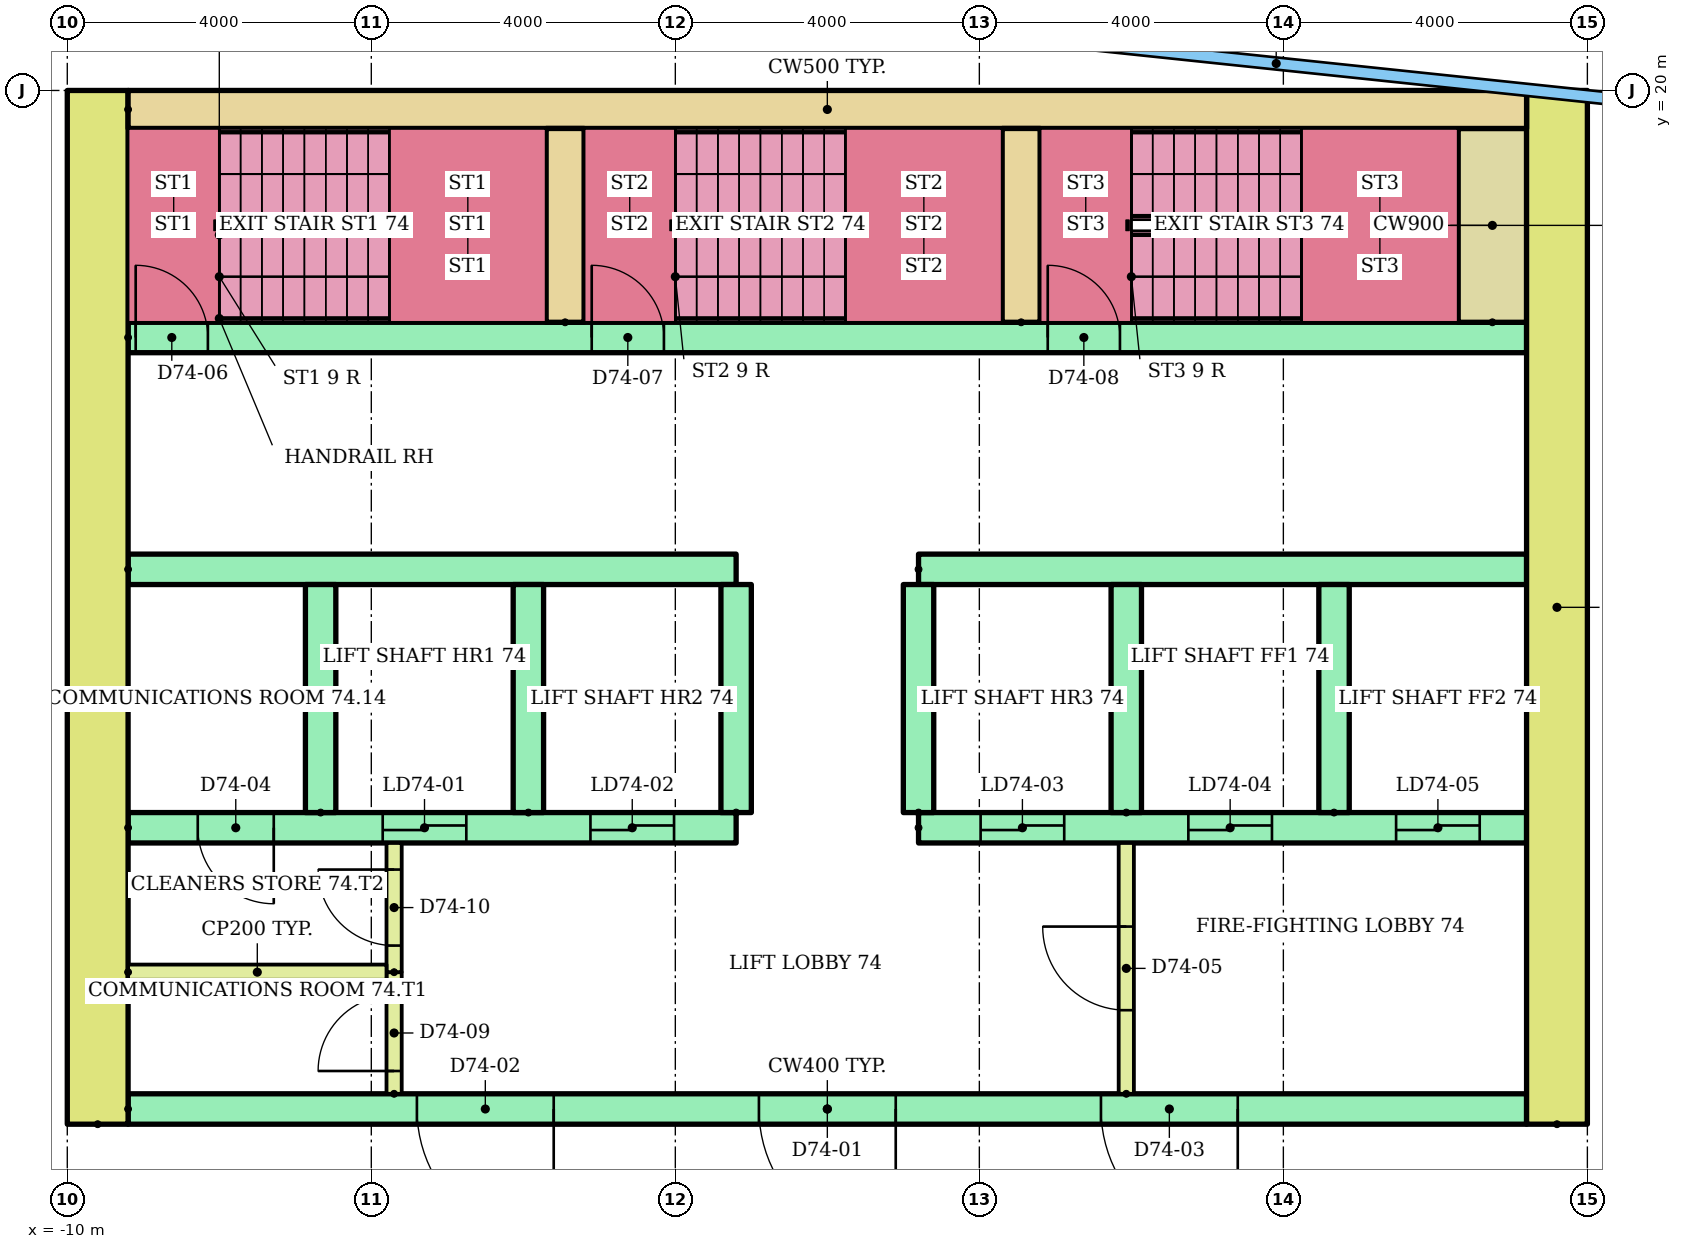
"""IFC4 building model, lengths in metres.
Left out: names, types, materials, properties, quantities, classifications, styles, units other than length and angle.
Written with IfcOpenShell. Run it as: python <this file> out.ifc"""

import sys

from ifc_helpers import new_model, si_unit, direction, frame, frame_2d, origin, place, context, subcontext, project, spatial, rectangle, extrude, element, fill, save


model = new_model("IFC4")
c1 = context("Model", 3, precision=1e-05, world=origin(), true_north=direction((0.0, 1.0)))
c2 = subcontext(c1, "Body", "Model", "MODEL_VIEW")
j1 = project(units=[si_unit("LENGTHUNIT", "METRE"), si_unit("PLANEANGLEUNIT", "RADIAN")], contexts=[c1])
p1 = place(None, origin())
s1 = spatial("IfcSite", under=j1, at=p1, CompositionType="ELEMENT")
p2 = place(p1, origin())
s2 = spatial("IfcBuilding", under=s1, at=p2, CompositionType="ELEMENT")
p3 = place(p2, frame((0.0, 0.0, 281.9)))
s3 = spatial("IfcBuildingStorey", under=s2, at=p3, CompositionType="ELEMENT", Elevation=281.9)
for number, where, z_axis, x_axis in (
    (1, (-9.6, 6.4, 0.0), (0.0, 0.0, 1.0), (0.0, 1.0, 0.0)),
    (2, (9.6, 6.4, 0.0), (0.0, 0.0, 1.0), (0.0, 1.0, 0.0)),
):
    element("IfcWall", number, at=place(p3, frame(where, z_axis=z_axis, x_axis=x_axis)), inside=s3, PredefinedType="SHEAR", context=c2, shape_type="SweptSolid", body=[
        extrude(rectangle(XDim=13.6, YDim=0.8, at=frame_2d((6.8, 0.0))), origin(), (0.0, 0.0, 1.0), 9.32),
    ])
p4 = place(p3, frame((-9.2, 19.75, 0.0)))
e3 = element("IfcWall", 3, at=p4, inside=s3, PredefinedType="SHEAR", context=c2, shape_type="SweptSolid", body=[
    extrude(rectangle(XDim=18.4, YDim=0.5, at=frame_2d((9.2, 0.0))), origin(), (0.0, 0.0, 1.0), 9.32),
])
p5 = place(p3, frame((-9.2, 6.6, 0.0)))
e4 = element("IfcWall", 4, at=p5, inside=s3, PredefinedType="SHEAR", context=c2, shape_type="SweptSolid", body=[
    extrude(rectangle(XDim=18.4, YDim=0.4, at=frame_2d((9.2, 0.0))), origin(), (0.0, 0.0, 1.0), 9.32),
])
p6 = place(p5, frame((8.3, 0.0, 0.0)))
e5 = element("IfcOpeningElement", 5, at=p6, cuts=e4, PredefinedType="OPENING", context=c2, shape_type="SweptSolid", body=[
    extrude(rectangle(XDim=1.8, YDim=2.1, at=frame_2d((0.9, 1.05))), frame((0.0, 0.21, 0.0), z_axis=(0.0, -1.0, 0.0), x_axis=(1.0, 0.0, 0.0)), (0.0, 0.0, 1.0), 0.42),
])
p7 = place(p5, frame((3.8, 0.0, 0.0)))
e6 = element("IfcOpeningElement", 6, at=p7, cuts=e4, PredefinedType="OPENING", context=c2, shape_type="SweptSolid", body=[
    extrude(rectangle(XDim=1.8, YDim=2.1, at=frame_2d((0.9, 1.05))), frame((0.0, 0.21, 0.0), z_axis=(0.0, -1.0, 0.0), x_axis=(1.0, 0.0, 0.0)), (0.0, 0.0, 1.0), 0.42),
])
p8 = place(p5, frame((12.8, 0.0, 0.0)))
e7 = element("IfcOpeningElement", 7, at=p8, cuts=e4, PredefinedType="OPENING", context=c2, shape_type="SweptSolid", body=[
    extrude(rectangle(XDim=1.8, YDim=2.1, at=frame_2d((0.9, 1.05))), frame((0.0, 0.21, 0.0), z_axis=(0.0, -1.0, 0.0), x_axis=(1.0, 0.0, 0.0)), (0.0, 0.0, 1.0), 0.42),
])
p9 = place(p3, frame((-9.2, 10.3, 0.0)))
e8 = element("IfcWall", 8, at=p9, inside=s3, PredefinedType="SHEAR", context=c2, shape_type="SweptSolid", body=[
    extrude(rectangle(XDim=8.0, YDim=0.4, at=frame_2d((4.0, 0.0))), origin(), (0.0, 0.0, 1.0), 9.32),
])
p10 = place(p9, frame((3.35, 0.0, 0.0)))
e9 = element("IfcOpeningElement", 9, at=p10, cuts=e8, PredefinedType="OPENING", context=c2, shape_type="SweptSolid", body=[
    extrude(rectangle(XDim=1.1, YDim=2.1, at=frame_2d((0.55, 1.05))), frame((0.0, 0.21, 0.0), z_axis=(0.0, -1.0, 0.0), x_axis=(1.0, 0.0, 0.0)), (0.0, 0.0, 1.0), 0.42),
])
p11 = place(p9, frame((6.083, 0.0, 0.0)))
e10 = element("IfcOpeningElement", 10, at=p11, cuts=e8, PredefinedType="OPENING", context=c2, shape_type="SweptSolid", body=[
    extrude(rectangle(XDim=1.1, YDim=2.1, at=frame_2d((0.55, 1.05))), frame((0.0, 0.21, 0.0), z_axis=(0.0, -1.0, 0.0), x_axis=(1.0, 0.0, 0.0)), (0.0, 0.0, 1.0), 0.42),
])
p12 = place(p9, frame((0.917, 0.0, 0.0)))
e11 = element("IfcOpeningElement", 11, at=p12, cuts=e8, PredefinedType="OPENING", context=c2, shape_type="SweptSolid", body=[
    extrude(rectangle(XDim=1.0, YDim=2.1, at=frame_2d((0.5, 1.05))), frame((0.0, 0.21, 0.0), z_axis=(0.0, -1.0, 0.0), x_axis=(1.0, 0.0, 0.0)), (0.0, 0.0, 1.0), 0.42),
])
p13 = place(p3, frame((-9.2, 13.7, 0.0)))
e12 = element("IfcWall", 12, at=p13, inside=s3, PredefinedType="SHEAR", context=c2, shape_type="SweptSolid", body=[
    extrude(rectangle(XDim=8.0, YDim=0.4, at=frame_2d((4.0, 0.0))), origin(), (0.0, 0.0, 1.0), 9.32),
])
p14 = place(p3, frame((1.2, 10.3, 0.0)))
e13 = element("IfcWall", 13, at=p14, inside=s3, PredefinedType="SHEAR", context=c2, shape_type="SweptSolid", body=[
    extrude(rectangle(XDim=8.0, YDim=0.4, at=frame_2d((4.0, 0.0))), origin(), (0.0, 0.0, 1.0), 9.32),
])
p15 = place(p14, frame((0.817, 0.0, 0.0)))
e14 = element("IfcOpeningElement", 14, at=p15, cuts=e13, PredefinedType="OPENING", context=c2, shape_type="SweptSolid", body=[
    extrude(rectangle(XDim=1.1, YDim=2.1, at=frame_2d((0.55, 1.05))), frame((0.0, 0.21, 0.0), z_axis=(0.0, -1.0, 0.0), x_axis=(1.0, 0.0, 0.0)), (0.0, 0.0, 1.0), 0.42),
])
p16 = place(p14, frame((3.55, 0.0, 0.0)))
e15 = element("IfcOpeningElement", 15, at=p16, cuts=e13, PredefinedType="OPENING", context=c2, shape_type="SweptSolid", body=[
    extrude(rectangle(XDim=1.1, YDim=2.1, at=frame_2d((0.55, 1.05))), frame((0.0, 0.21, 0.0), z_axis=(0.0, -1.0, 0.0), x_axis=(1.0, 0.0, 0.0)), (0.0, 0.0, 1.0), 0.42),
])
p17 = place(p14, frame((6.283, 0.0, 0.0)))
e16 = element("IfcOpeningElement", 16, at=p17, cuts=e13, PredefinedType="OPENING", context=c2, shape_type="SweptSolid", body=[
    extrude(rectangle(XDim=1.1, YDim=2.1, at=frame_2d((0.55, 1.05))), frame((0.0, 0.21, 0.0), z_axis=(0.0, -1.0, 0.0), x_axis=(1.0, 0.0, 0.0)), (0.0, 0.0, 1.0), 0.42),
])
p18 = place(p3, frame((1.2, 13.7, 0.0)))
e17 = element("IfcWall", 17, at=p18, inside=s3, PredefinedType="SHEAR", context=c2, shape_type="SweptSolid", body=[
    extrude(rectangle(XDim=8.0, YDim=0.4, at=frame_2d((4.0, 0.0))), origin(), (0.0, 0.0, 1.0), 9.32),
])
for number, where, z_axis, x_axis in (
    (18, (-6.667, 10.5, 0.0), (0.0, 0.0, 1.0), (0.0, 1.0, 0.0)),
    (19, (-3.933, 10.5, 0.0), (0.0, 0.0, 1.0), (0.0, 1.0, 0.0)),
    (20, (-1.2, 10.5, 0.0), (0.0, 0.0, 1.0), (0.0, 1.0, 0.0)),
    (21, (1.2, 10.5, 0.0), (0.0, 0.0, 1.0), (0.0, 1.0, 0.0)),
    (22, (3.933, 10.5, 0.0), (0.0, 0.0, 1.0), (0.0, 1.0, 0.0)),
    (23, (6.667, 10.5, 0.0), (0.0, 0.0, 1.0), (0.0, 1.0, 0.0)),
):
    element("IfcWall", number, at=place(p3, frame(where, z_axis=z_axis, x_axis=x_axis)), inside=s3, PredefinedType="SHEAR", context=c2, shape_type="SweptSolid", body=[
        extrude(rectangle(XDim=3.0, YDim=0.4, at=frame_2d((1.5, 0.0))), origin(), (0.0, 0.0, 1.0), 9.32),
    ])
p19 = place(p3, frame((3.933, 6.8, 0.0), z_axis=(0.0, 0.0, 1.0), x_axis=(0.0, 1.0, 0.0)))
e24 = element("IfcWall", 24, at=p19, inside=s3, PredefinedType="PARTITIONING", context=c2, shape_type="SweptSolid", body=[
    extrude(rectangle(XDim=3.3, YDim=0.2, at=frame_2d((1.65, 0.0))), origin(), (0.0, 0.0, 1.0), 9.32),
])
p20 = place(p19, frame((1.1, 0.0, 0.0)))
e25 = element("IfcOpeningElement", 25, at=p20, cuts=e24, PredefinedType="OPENING", context=c2, shape_type="SweptSolid", body=[
    extrude(rectangle(XDim=1.1, YDim=2.1, at=frame_2d((0.55, 1.05))), frame((0.0, 0.11, 0.0), z_axis=(0.0, -1.0, 0.0), x_axis=(1.0, 0.0, 0.0)), (0.0, 0.0, 1.0), 0.22),
])
p21 = place(p3, frame((-9.2, 16.75, 0.0)))
e26 = element("IfcWall", 26, at=p21, inside=s3, PredefinedType="SHEAR", context=c2, shape_type="SweptSolid", body=[
    extrude(rectangle(XDim=18.4, YDim=0.4, at=frame_2d((9.2, 0.0))), origin(), (0.0, 0.0, 1.0), 9.32),
])
p22 = place(p21, frame((0.1, 0.0, 0.0)))
e27 = element("IfcOpeningElement", 27, at=p22, cuts=e26, PredefinedType="OPENING", context=c2, shape_type="SweptSolid", body=[
    extrude(rectangle(XDim=0.95, YDim=2.1, at=frame_2d((0.475, 1.05))), frame((0.0, 0.21, 0.0), z_axis=(0.0, -1.0, 0.0), x_axis=(1.0, 0.0, 0.0)), (0.0, 0.0, 1.0), 0.42),
])
p23 = place(p21, frame((6.1, 0.0, 0.0)))
e28 = element("IfcOpeningElement", 28, at=p23, cuts=e26, PredefinedType="OPENING", context=c2, shape_type="SweptSolid", body=[
    extrude(rectangle(XDim=0.95, YDim=2.1, at=frame_2d((0.475, 1.05))), frame((0.0, 0.21, 0.0), z_axis=(0.0, -1.0, 0.0), x_axis=(1.0, 0.0, 0.0)), (0.0, 0.0, 1.0), 0.42),
])
p24 = place(p21, frame((12.1, 0.0, 0.0)))
e29 = element("IfcOpeningElement", 29, at=p24, cuts=e26, PredefinedType="OPENING", context=c2, shape_type="SweptSolid", body=[
    extrude(rectangle(XDim=0.95, YDim=2.1, at=frame_2d((0.475, 1.05))), frame((0.0, 0.21, 0.0), z_axis=(0.0, -1.0, 0.0), x_axis=(1.0, 0.0, 0.0)), (0.0, 0.0, 1.0), 0.42),
])
for number, where, z_axis, x_axis in (
    (30, (-3.45, 16.95, 0.0), (0.0, 0.0, 1.0), (0.0, 1.0, 0.0)),
    (31, (2.55, 16.95, 0.0), (0.0, 0.0, 1.0), (0.0, 1.0, 0.0)),
):
    element("IfcWall", number, at=place(p3, frame(where, z_axis=z_axis, x_axis=x_axis)), inside=s3, PredefinedType="SHEAR", context=c2, shape_type="SweptSolid", body=[
        extrude(rectangle(XDim=2.55, YDim=0.5, at=frame_2d((1.275, 0.0))), origin(), (0.0, 0.0, 1.0), 9.32),
    ])
p25 = place(p3, frame((8.75, 16.95, 0.0), z_axis=(0.0, 0.0, 1.0), x_axis=(0.0, 1.0, 0.0)))
e32 = element("IfcWall", 32, at=p25, inside=s3, PredefinedType="SHEAR", context=c2, shape_type="SweptSolid", body=[
    extrude(rectangle(XDim=2.55, YDim=0.9, at=frame_2d((1.275, 0.0))), origin(), (0.0, 0.0, 1.0), 9.32),
])
p26 = place(p3, frame((-5.7, 6.8, 0.0), z_axis=(0.0, 0.0, 1.0), x_axis=(0.0, 1.0, 0.0)))
e33 = element("IfcWall", 33, at=p26, inside=s3, PredefinedType="PARTITIONING", context=c2, shape_type="SweptSolid", body=[
    extrude(rectangle(XDim=1.6, YDim=0.2, at=frame_2d((0.8, 0.0))), origin(), (0.0, 0.0, 1.0), 9.32),
])
p27 = place(p26, frame((0.3, 0.0, 0.0)))
e34 = element("IfcOpeningElement", 34, at=p27, cuts=e33, PredefinedType="OPENING", context=c2, shape_type="SweptSolid", body=[
    extrude(rectangle(XDim=1.0, YDim=2.1, at=frame_2d((0.5, 1.05))), frame((0.0, 0.11, 0.0), z_axis=(0.0, -1.0, 0.0), x_axis=(1.0, 0.0, 0.0)), (0.0, 0.0, 1.0), 0.22),
])
p28 = place(p3, frame((-5.7, 8.4, 0.0), z_axis=(0.0, 0.0, 1.0), x_axis=(0.0, 1.0, 0.0)))
e35 = element("IfcWall", 35, at=p28, inside=s3, PredefinedType="PARTITIONING", context=c2, shape_type="SweptSolid", body=[
    extrude(rectangle(XDim=1.7, YDim=0.2, at=frame_2d((0.85, 0.0))), origin(), (0.0, 0.0, 1.0), 9.32),
])
p29 = place(p28, frame((0.35, 0.0, 0.0)))
e36 = element("IfcOpeningElement", 36, at=p29, cuts=e35, PredefinedType="OPENING", context=c2, shape_type="SweptSolid", body=[
    extrude(rectangle(XDim=1.0, YDim=2.1, at=frame_2d((0.5, 1.05))), frame((0.0, 0.11, 0.0), z_axis=(0.0, -1.0, 0.0), x_axis=(1.0, 0.0, 0.0)), (0.0, 0.0, 1.0), 0.22),
])
p30 = place(p3, frame((-9.2, 8.4, 0.0)))
e37 = element("IfcWall", 37, at=p30, inside=s3, PredefinedType="PARTITIONING", context=c2, shape_type="SweptSolid", body=[
    extrude(rectangle(XDim=3.4, YDim=0.2, at=frame_2d((1.7, 0.0))), origin(), (0.0, 0.0, 1.0), 9.32),
])
p31 = place(p6, frame((1.8, 0.0, 0.0), z_axis=(0.0, 0.0, 1.0), x_axis=(-1.0, 0.0, 0.0)))
e38 = element("IfcDoor", 38, at=p31, inside=s3, OperationType="DOUBLE_DOOR_SINGLE_SWING", PredefinedType="DOOR", context=c2, shape_type="SweptSolid", body=[
    extrude(rectangle(XDim=1.8, YDim=2.1, at=frame_2d((0.9, 1.05))), frame((0.0, 0.025, 0.0), z_axis=(0.0, -1.0, 0.0), x_axis=(1.0, 0.0, 0.0)), (0.0, 0.0, 1.0), 0.05),
])
fill(e5, e38)
p32 = place(p7, frame((1.8, 0.0, 0.0), z_axis=(0.0, 0.0, 1.0), x_axis=(-1.0, 0.0, 0.0)))
e39 = element("IfcDoor", 39, at=p32, inside=s3, OperationType="DOUBLE_DOOR_SINGLE_SWING", PredefinedType="DOOR", context=c2, shape_type="SweptSolid", body=[
    extrude(rectangle(XDim=1.8, YDim=2.1, at=frame_2d((0.9, 1.05))), frame((0.0, 0.025, 0.0), z_axis=(0.0, -1.0, 0.0), x_axis=(1.0, 0.0, 0.0)), (0.0, 0.0, 1.0), 0.05),
])
fill(e6, e39)
p33 = place(p8, frame((1.8, 0.0, 0.0), z_axis=(0.0, 0.0, 1.0), x_axis=(-1.0, 0.0, 0.0)))
e40 = element("IfcDoor", 40, at=p33, inside=s3, OperationType="DOUBLE_DOOR_SINGLE_SWING", PredefinedType="DOOR", context=c2, shape_type="SweptSolid", body=[
    extrude(rectangle(XDim=1.8, YDim=2.1, at=frame_2d((0.9, 1.05))), frame((0.0, 0.025, 0.0), z_axis=(0.0, -1.0, 0.0), x_axis=(1.0, 0.0, 0.0)), (0.0, 0.0, 1.0), 0.05),
])
fill(e7, e40)
p34 = place(p10, origin())
e41 = element("IfcDoor", 41, at=p34, inside=s3, OperationType="SLIDING_TO_LEFT", PredefinedType="DOOR", context=c2, shape_type="SweptSolid", body=[
    extrude(rectangle(XDim=1.1, YDim=2.1, at=frame_2d((0.55, 1.05))), frame((0.0, 0.025, 0.0), z_axis=(0.0, -1.0, 0.0), x_axis=(1.0, 0.0, 0.0)), (0.0, 0.0, 1.0), 0.05),
])
fill(e9, e41)
p35 = place(p11, origin())
e42 = element("IfcDoor", 42, at=p35, inside=s3, OperationType="SLIDING_TO_LEFT", PredefinedType="DOOR", context=c2, shape_type="SweptSolid", body=[
    extrude(rectangle(XDim=1.1, YDim=2.1, at=frame_2d((0.55, 1.05))), frame((0.0, 0.025, 0.0), z_axis=(0.0, -1.0, 0.0), x_axis=(1.0, 0.0, 0.0)), (0.0, 0.0, 1.0), 0.05),
])
fill(e10, e42)
p36 = place(p15, origin())
e43 = element("IfcDoor", 43, at=p36, inside=s3, OperationType="SLIDING_TO_LEFT", PredefinedType="DOOR", context=c2, shape_type="SweptSolid", body=[
    extrude(rectangle(XDim=1.1, YDim=2.1, at=frame_2d((0.55, 1.05))), frame((0.0, 0.025, 0.0), z_axis=(0.0, -1.0, 0.0), x_axis=(1.0, 0.0, 0.0)), (0.0, 0.0, 1.0), 0.05),
])
fill(e14, e43)
p37 = place(p16, origin())
e44 = element("IfcDoor", 44, at=p37, inside=s3, OperationType="SLIDING_TO_LEFT", PredefinedType="DOOR", context=c2, shape_type="SweptSolid", body=[
    extrude(rectangle(XDim=1.1, YDim=2.1, at=frame_2d((0.55, 1.05))), frame((0.0, 0.025, 0.0), z_axis=(0.0, -1.0, 0.0), x_axis=(1.0, 0.0, 0.0)), (0.0, 0.0, 1.0), 0.05),
])
fill(e15, e44)
p38 = place(p17, origin())
e45 = element("IfcDoor", 45, at=p38, inside=s3, OperationType="SLIDING_TO_LEFT", PredefinedType="DOOR", context=c2, shape_type="SweptSolid", body=[
    extrude(rectangle(XDim=1.1, YDim=2.1, at=frame_2d((0.55, 1.05))), frame((0.0, 0.025, 0.0), z_axis=(0.0, -1.0, 0.0), x_axis=(1.0, 0.0, 0.0)), (0.0, 0.0, 1.0), 0.05),
])
fill(e16, e45)
p39 = place(p12, frame((1.0, 0.0, 0.0), z_axis=(0.0, 0.0, 1.0), x_axis=(-1.0, 0.0, 0.0)))
e46 = element("IfcDoor", 46, at=p39, inside=s3, OperationType="SINGLE_SWING_RIGHT", PredefinedType="DOOR", context=c2, shape_type="SweptSolid", body=[
    extrude(rectangle(XDim=1.0, YDim=2.1, at=frame_2d((0.5, 1.05))), frame((0.0, 0.025, 0.0), z_axis=(0.0, -1.0, 0.0), x_axis=(1.0, 0.0, 0.0)), (0.0, 0.0, 1.0), 0.05),
])
fill(e11, e46)
p40 = place(p20, origin())
e47 = element("IfcDoor", 47, at=p40, inside=s3, OperationType="SINGLE_SWING_RIGHT", PredefinedType="DOOR", context=c2, shape_type="SweptSolid", body=[
    extrude(rectangle(XDim=1.1, YDim=2.1, at=frame_2d((0.55, 1.05))), frame((0.0, 0.025, 0.0), z_axis=(0.0, -1.0, 0.0), x_axis=(1.0, 0.0, 0.0)), (0.0, 0.0, 1.0), 0.05),
])
fill(e25, e47)
p41 = place(p22, origin())
e48 = element("IfcDoor", 48, at=p41, inside=s3, OperationType="SINGLE_SWING_LEFT", PredefinedType="DOOR", context=c2, shape_type="SweptSolid", body=[
    extrude(rectangle(XDim=0.95, YDim=2.1, at=frame_2d((0.475, 1.05))), frame((0.0, 0.025, 0.0), z_axis=(0.0, -1.0, 0.0), x_axis=(1.0, 0.0, 0.0)), (0.0, 0.0, 1.0), 0.05),
])
fill(e27, e48)
p42 = place(p23, origin())
e49 = element("IfcDoor", 49, at=p42, inside=s3, OperationType="SINGLE_SWING_LEFT", PredefinedType="DOOR", context=c2, shape_type="SweptSolid", body=[
    extrude(rectangle(XDim=0.95, YDim=2.1, at=frame_2d((0.475, 1.05))), frame((0.0, 0.025, 0.0), z_axis=(0.0, -1.0, 0.0), x_axis=(1.0, 0.0, 0.0)), (0.0, 0.0, 1.0), 0.05),
])
fill(e28, e49)
p43 = place(p24, origin())
e50 = element("IfcDoor", 50, at=p43, inside=s3, OperationType="SINGLE_SWING_LEFT", PredefinedType="DOOR", context=c2, shape_type="SweptSolid", body=[
    extrude(rectangle(XDim=0.95, YDim=2.1, at=frame_2d((0.475, 1.05))), frame((0.0, 0.025, 0.0), z_axis=(0.0, -1.0, 0.0), x_axis=(1.0, 0.0, 0.0)), (0.0, 0.0, 1.0), 0.05),
])
fill(e29, e50)
p44 = place(p27, origin())
e51 = element("IfcDoor", 51, at=p44, inside=s3, OperationType="SINGLE_SWING_LEFT", PredefinedType="DOOR", context=c2, shape_type="SweptSolid", body=[
    extrude(rectangle(XDim=1.0, YDim=2.1, at=frame_2d((0.5, 1.05))), frame((0.0, 0.025, 0.0), z_axis=(0.0, -1.0, 0.0), x_axis=(1.0, 0.0, 0.0)), (0.0, 0.0, 1.0), 0.05),
])
fill(e34, e51)
p45 = place(p29, origin())
e52 = element("IfcDoor", 52, at=p45, inside=s3, OperationType="SINGLE_SWING_RIGHT", PredefinedType="DOOR", context=c2, shape_type="SweptSolid", body=[
    extrude(rectangle(XDim=1.0, YDim=2.1, at=frame_2d((0.5, 1.05))), frame((0.0, 0.025, 0.0), z_axis=(0.0, -1.0, 0.0), x_axis=(1.0, 0.0, 0.0)), (0.0, 0.0, 1.0), 0.05),
])
fill(e36, e52)
save(model, sys.argv[1])
